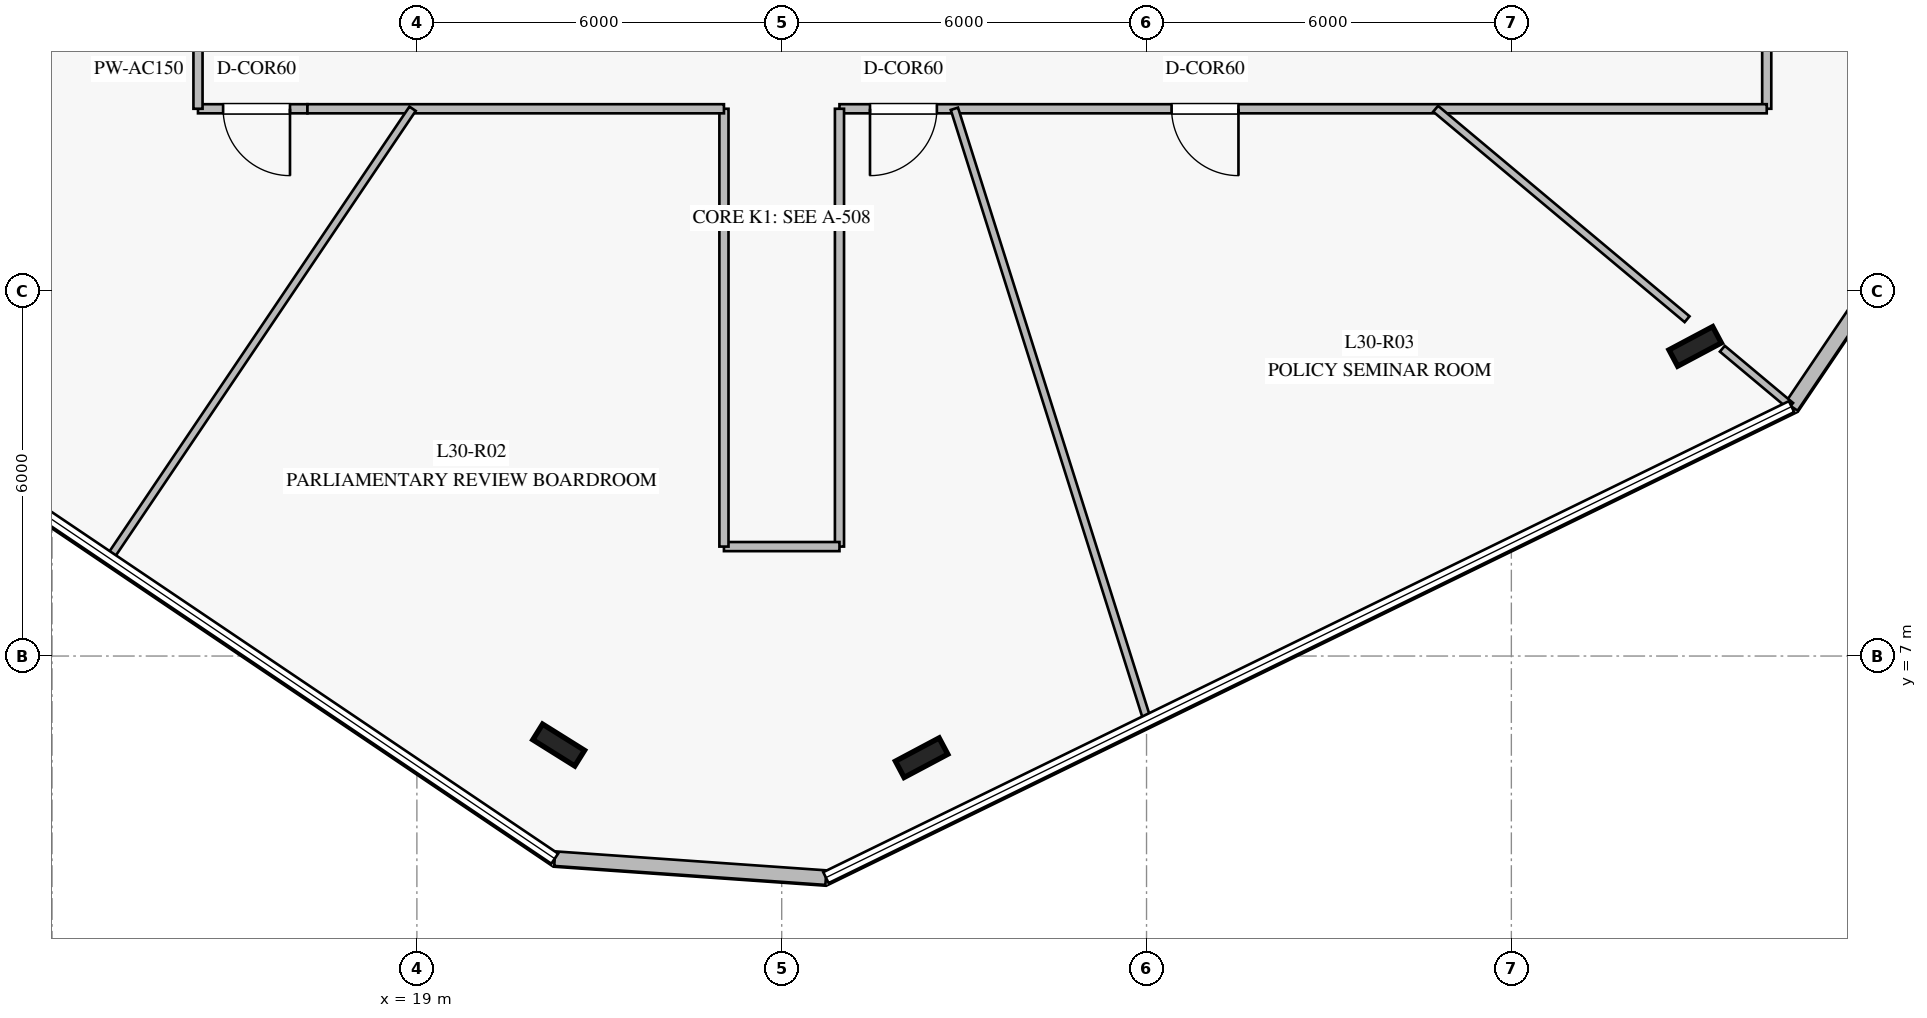
"""IFC4 building model, lengths in metres.
Left out: names, types, materials, properties, quantities, classifications, styles, units other than length and angle.
Written with IfcOpenShell. Run it as: python <this file> out.ifc"""

import sys

from ifc_helpers import new_model, si_unit, direction, frame, frame_2d, origin, origin_2d, place, context, subcontext, project, spatial, rectangle, i_section, extrude, element, fill, save


model = new_model("IFC4")
c1 = context("Model", 3, precision=1e-05, world=origin(), true_north=direction((0.0, 1.0)))
c2 = subcontext(c1, "Body", "Model", "MODEL_VIEW")
j1 = project(units=[si_unit("LENGTHUNIT", "METRE"), si_unit("PLANEANGLEUNIT", "RADIAN")], contexts=[c1])
p1 = place(None, origin())
s1 = spatial("IfcSite", under=j1, at=p1, CompositionType="ELEMENT")
p2 = place(p1, origin())
s2 = spatial("IfcBuilding", under=s1, at=p2, CompositionType="ELEMENT")
p3 = place(p2, frame((0.0, 0.0, 126.4)))
s3 = spatial("IfcBuildingStorey", under=s2, at=p3, CompositionType="ELEMENT", Elevation=126.4)
for number, where, z_axis, x_axis in (
    (1, (21.332, 5.536, 0.0), (0.0, 0.0, 1.0), (-0.848, 0.53, 0.0)),
    (2, (27.301, 5.328, 0.0), (0.0, 0.0, 1.0), (0.883, 0.469, 0.0)),
    (3, (40.023, 12.092, 0.0), (0.0, 0.0, 1.0), (0.883, 0.469, 0.0)),
):
    element("IfcColumn", number, at=place(p3, frame(where, z_axis=z_axis, x_axis=x_axis)), inside=s3, PredefinedType="COLUMN", context=c2, shape_type="SweptSolid", body=[
        extrude(i_section(OverallWidth=0.303, OverallDepth=0.814, WebThickness=0.021, FlangeThickness=0.04, at=origin_2d()), origin(), (0.0, 0.0, 1.0), 4.0),
    ])
p4 = place(p3, frame((21.267, 3.668, 0.0), z_axis=(0.0, 0.0, 1.0), x_axis=(0.997561857217, -0.069787828636, 0.0)))
e4 = element("IfcWall", 4, at=p4, inside=s3, PredefinedType="STANDARD", context=c2, shape_type="SweptSolid", body=[
    extrude(rectangle(XDim=4.471, YDim=0.24, at=frame_2d((2.235, 0.0))), origin(), (0.0, 0.0, 1.0), 3.76),
])
p5 = place(p3, frame((41.608, 11.102, 0.0), z_axis=(0.0, 0.0, 1.0), x_axis=(0.559078804203, 0.82911452206, 0.0)))
e5 = element("IfcWall", 5, at=p5, inside=s3, PredefinedType="STANDARD", context=c2, shape_type="SweptSolid", body=[
    extrude(rectangle(XDim=4.47, YDim=0.24, at=frame_2d((2.235, 0.0))), origin(), (0.0, 0.0, 1.0), 3.76),
])
p6 = place(p3, frame((17.2, 16.0, 0.0), z_axis=(0.0, 0.0, 1.0), x_axis=(-1.0, 0.0, 0.0)))
e6 = element("IfcWall", 6, at=p6, inside=s3, PredefinedType="PARTITIONING", context=c2, shape_type="SweptSolid", body=[
    extrude(rectangle(XDim=1.8, YDim=0.15, at=frame_2d((0.9, 0.0))), origin(), (0.0, 0.0, 1.0), 3.36),
])
p7 = place(p6, frame((0.287, 0.0, 0.0)))
e7 = element("IfcOpeningElement", 7, at=p7, cuts=e6, PredefinedType="OPENING", context=c2, shape_type="SweptSolid", body=[
    extrude(rectangle(XDim=1.1, YDim=2.2, at=frame_2d((0.55, 1.1))), frame((0.0, 0.085, 0.0), z_axis=(0.0, -1.0, 0.0), x_axis=(1.0, 0.0, 0.0)), (0.0, 0.0, 1.0), 0.17),
])
for number, where, z_axis, x_axis in (
    (8, (15.4, 16.0, 0.0), (0.0, 0.0, 1.0), (0.0, 1.0, 0.0)),
    (9, (41.2, 17.8, 0.0), (0.0, 0.0, 1.0), (0.0, -1.0, 0.0)),
):
    element("IfcWall", number, at=place(p3, frame(where, z_axis=z_axis, x_axis=x_axis)), inside=s3, PredefinedType="PARTITIONING", context=c2, shape_type="SweptSolid", body=[
        extrude(rectangle(XDim=1.8, YDim=0.15, at=frame_2d((0.9, 0.0))), origin(), (0.0, 0.0, 1.0), 3.21),
    ])
p8 = place(p3, frame((41.2, 16.0, 0.0), z_axis=(0.0, 0.0, 1.0), x_axis=(-1.0, 0.0, 0.0)))
e10 = element("IfcWall", 10, at=p8, inside=s3, PredefinedType="PARTITIONING", context=c2, shape_type="SweptSolid", body=[
    extrude(rectangle(XDim=15.25, YDim=0.15, at=frame_2d((7.625, 0.0))), origin(), (0.0, 0.0, 1.0), 3.21),
])
p9 = place(p8, frame((13.648, 0.0, 0.0)))
e11 = element("IfcOpeningElement", 11, at=p9, cuts=e10, PredefinedType="OPENING", context=c2, shape_type="SweptSolid", body=[
    extrude(rectangle(XDim=1.1, YDim=2.2, at=frame_2d((0.55, 1.1))), frame((0.0, 0.085, 0.0), z_axis=(0.0, -1.0, 0.0), x_axis=(1.0, 0.0, 0.0)), (0.0, 0.0, 1.0), 0.17),
])
p10 = place(p8, frame((8.688, 0.0, 0.0)))
e12 = element("IfcOpeningElement", 12, at=p10, cuts=e10, PredefinedType="OPENING", context=c2, shape_type="SweptSolid", body=[
    extrude(rectangle(XDim=1.1, YDim=2.2, at=frame_2d((0.55, 1.1))), frame((0.0, 0.085, 0.0), z_axis=(0.0, -1.0, 0.0), x_axis=(1.0, 0.0, 0.0)), (0.0, 0.0, 1.0), 0.17),
])
p11 = place(p3, frame((25.95, 16.0, 0.0), z_axis=(0.0, 0.0, 1.0), x_axis=(0.0, -1.0, 0.0)))
e13 = element("IfcWall", 13, at=p11, inside=s3, PredefinedType="PARTITIONING", context=c2, shape_type="SweptSolid", body=[
    extrude(rectangle(XDim=7.2, YDim=0.15, at=frame_2d((3.6, 0.0))), origin(), (0.0, 0.0, 1.0), 3.36),
])
p12 = place(p3, frame((25.95, 8.8, 0.0), z_axis=(0.0, 0.0, 1.0), x_axis=(-1.0, 0.0, 0.0)))
e14 = element("IfcWall", 14, at=p12, inside=s3, PredefinedType="PARTITIONING", context=c2, shape_type="SweptSolid", body=[
    extrude(rectangle(XDim=1.9, YDim=0.15, at=frame_2d((0.95, 0.0))), origin(), (0.0, 0.0, 1.0), 3.76),
])
p13 = place(p3, frame((24.05, 8.8, 0.0), z_axis=(0.0, 0.0, 1.0), x_axis=(0.0, 1.0, 0.0)))
e15 = element("IfcWall", 15, at=p13, inside=s3, PredefinedType="PARTITIONING", context=c2, shape_type="SweptSolid", body=[
    extrude(rectangle(XDim=7.2, YDim=0.15, at=frame_2d((3.6, 0.0))), origin(), (0.0, 0.0, 1.0), 3.36),
])
p14 = place(p3, frame((24.05, 16.0, 0.0), z_axis=(0.0, 0.0, 1.0), x_axis=(-1.0, 0.0, 0.0)))
e16 = element("IfcWall", 16, at=p14, inside=s3, PredefinedType="PARTITIONING", context=c2, shape_type="SweptSolid", body=[
    extrude(rectangle(XDim=6.85, YDim=0.15, at=frame_2d((3.425, 0.0))), origin(), (0.0, 0.0, 1.0), 3.21),
])
p15 = place(p3, frame((18.929, 16.0, 0.0), z_axis=(0.0, 0.0, 1.0), x_axis=(-0.559161840845, -0.829058523714, 0.0)))
e17 = element("IfcWall", 17, at=p15, inside=s3, PredefinedType="PARTITIONING", context=c2, shape_type="SweptSolid", body=[
    extrude(rectangle(XDim=8.899, YDim=0.125, at=frame_2d((4.45, 0.0))), origin(), (0.0, 0.0, 1.0), 3.05),
])
p16 = place(p3, frame((27.84, 16.0, 0.0), z_axis=(0.0, 0.0, 1.0), x_axis=(0.300858550785, -0.953668775005, 0.0)))
e18 = element("IfcWall", 18, at=p16, inside=s3, PredefinedType="PARTITIONING", context=c2, shape_type="SweptSolid", body=[
    extrude(rectangle(XDim=10.536, YDim=0.125, at=frame_2d((5.268, 0.0))), origin(), (0.0, 0.0, 1.0), 3.16),
])
p17 = place(p3, frame((35.755, 16.0, 0.0), z_axis=(0.0, 0.0, 1.0), x_axis=(0.766842661683, -0.641835128536, 0.0)))
e19 = element("IfcWall", 19, at=p17, inside=s3, PredefinedType="PARTITIONING", context=c2, shape_type="SweptSolid", body=[
    extrude(rectangle(XDim=5.392, YDim=0.125, at=frame_2d((2.696, 0.0))), origin(), (0.0, 0.0, 1.0), 3.36),
])
p18 = place(p3, frame((40.47, 12.054, 0.0), z_axis=(0.0, 0.0, 1.0), x_axis=(0.766853077224, -0.641822684199, 0.0)))
e20 = element("IfcWall", 20, at=p18, inside=s3, PredefinedType="PARTITIONING", context=c2, shape_type="SweptSolid", body=[
    extrude(rectangle(XDim=1.465, YDim=0.125, at=frame_2d((0.732, 0.0))), origin(), (0.0, 0.0, 1.0), 3.76),
])
p19 = place(p7, origin())
e21 = element("IfcDoor", 21, at=p19, inside=s3, OperationType="SINGLE_SWING_LEFT", PredefinedType="DOOR", context=c2, shape_type="SweptSolid", body=[
    extrude(rectangle(XDim=1.1, YDim=2.2, at=frame_2d((0.55, 1.1))), frame((0.0, 0.025, 0.0), z_axis=(0.0, -1.0, 0.0), x_axis=(1.0, 0.0, 0.0)), (0.0, 0.0, 1.0), 0.05),
])
fill(e7, e21)
p20 = place(p9, origin())
e22 = element("IfcDoor", 22, at=p20, inside=s3, OperationType="SINGLE_SWING_RIGHT", PredefinedType="DOOR", context=c2, shape_type="SweptSolid", body=[
    extrude(rectangle(XDim=1.1, YDim=2.2, at=frame_2d((0.55, 1.1))), frame((0.0, 0.025, 0.0), z_axis=(0.0, -1.0, 0.0), x_axis=(1.0, 0.0, 0.0)), (0.0, 0.0, 1.0), 0.05),
])
fill(e11, e22)
p21 = place(p10, origin())
e23 = element("IfcDoor", 23, at=p21, inside=s3, OperationType="SINGLE_SWING_LEFT", PredefinedType="DOOR", context=c2, shape_type="SweptSolid", body=[
    extrude(rectangle(XDim=1.1, YDim=2.2, at=frame_2d((0.55, 1.1))), frame((0.0, 0.025, 0.0), z_axis=(0.0, -1.0, 0.0), x_axis=(1.0, 0.0, 0.0)), (0.0, 0.0, 1.0), 0.05),
])
fill(e12, e23)
save(model, sys.argv[1])
